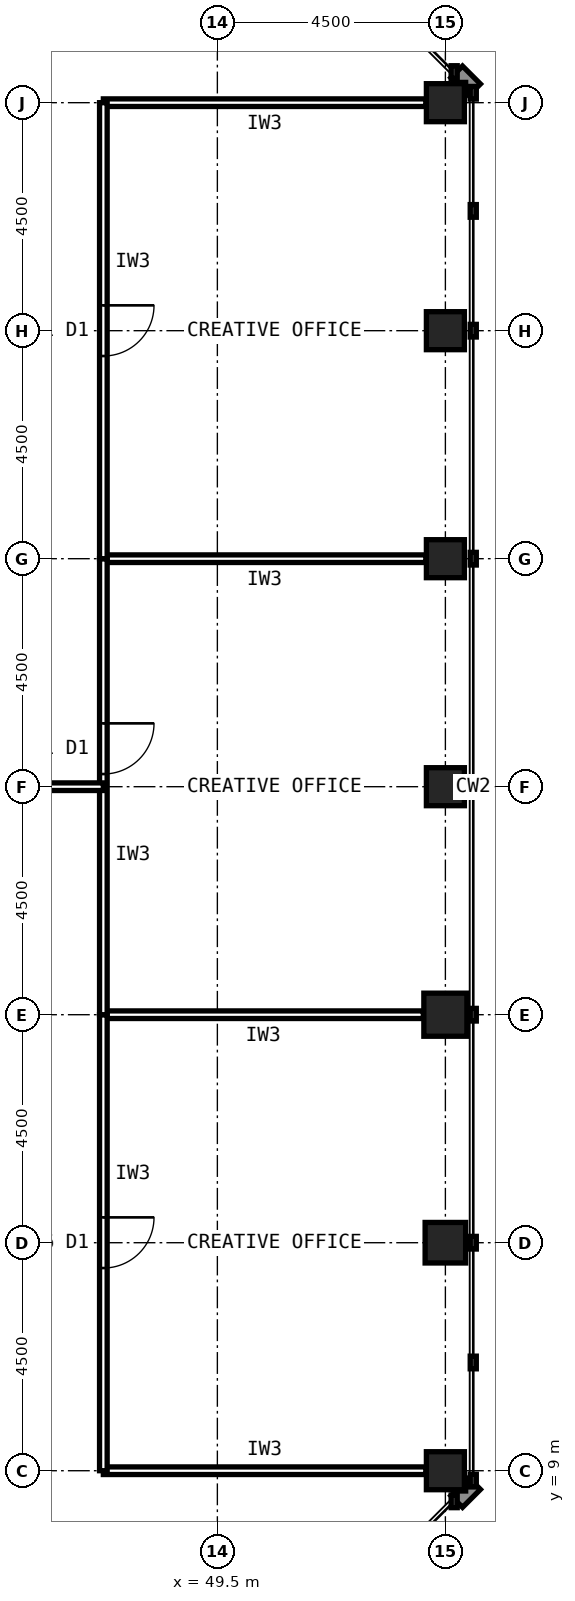
"""IFC4 building model, lengths in metres.
Left out: names, types, materials, properties, quantities, classifications, styles, units other than length and angle.
Written with IfcOpenShell. Run it as: python <this file> out.ifc"""

import sys

from ifc_helpers import new_model, si_unit, direction, frame, frame_2d, origin, origin_2d, place, context, subcontext, project, spatial, rectangle, hollow_rectangle, extrude, element, fill, save


model = new_model("IFC4")
c1 = context("Model", 3, precision=1e-05, world=origin(), true_north=direction((0.0, 1.0)))
c2 = subcontext(c1, "Body", "Model", "MODEL_VIEW")
j1 = project(units=[si_unit("LENGTHUNIT", "METRE"), si_unit("PLANEANGLEUNIT", "RADIAN")], contexts=[c1])
p1 = place(None, origin())
s1 = spatial("IfcSite", under=j1, at=p1, CompositionType="ELEMENT")
p2 = place(p1, origin())
s2 = spatial("IfcBuilding", under=s1, at=p2, CompositionType="ELEMENT")
p3 = place(p2, frame((0.0, 0.0, 151.6)))
s3 = spatial("IfcBuildingStorey", under=s2, at=p3, CompositionType="ELEMENT", Elevation=151.6)
p4 = place(p3, frame((54.0, 9.0, 0.0), z_axis=(0.0, 0.0, 1.0), x_axis=(1.0, 0.0, 0.0)))
e1 = element("IfcColumn", 1, at=p4, inside=s3, PredefinedType="COLUMN", context=c2, shape_type="SweptSolid", body=[
    extrude(hollow_rectangle(XDim=0.75, YDim=0.75, WallThickness=0.04, at=origin_2d()), origin(), (0.0, 0.0, 1.0), 4.0),
])
p5 = place(p3, frame((54.0, 13.5, 0.0), z_axis=(0.0, 0.0, 1.0), x_axis=(1.0, 0.0, 0.0)))
e2 = element("IfcColumn", 2, at=p5, inside=s3, PredefinedType="COLUMN", context=c2, shape_type="SweptSolid", body=[
    extrude(hollow_rectangle(XDim=0.8, YDim=0.8, WallThickness=0.045, at=origin_2d()), origin(), (0.0, 0.0, 1.0), 4.0),
])
p6 = place(p3, frame((54.0, 18.0, 0.0), z_axis=(0.0, 0.0, 1.0), x_axis=(1.0, 0.0, 0.0)))
e3 = element("IfcColumn", 3, at=p6, inside=s3, PredefinedType="COLUMN", context=c2, shape_type="SweptSolid", body=[
    extrude(hollow_rectangle(XDim=0.85, YDim=0.85, WallThickness=0.05, at=origin_2d()), origin(), (0.0, 0.0, 1.0), 4.0),
])
for number, where, z_axis, x_axis in (
    (4, (54.0, 22.5, 0.0), (0.0, 0.0, 1.0), (1.0, 0.0, 0.0)),
    (5, (54.0, 27.0, 0.0), (0.0, 0.0, 1.0), (1.0, 0.0, 0.0)),
    (6, (54.0, 31.5, 0.0), (0.0, 0.0, 1.0), (1.0, 0.0, 0.0)),
    (7, (54.0, 36.0, 0.0), (0.0, 0.0, 1.0), (1.0, 0.0, 0.0)),
):
    element("IfcColumn", number, at=place(p3, frame(where, z_axis=z_axis, x_axis=x_axis)), inside=s3, PredefinedType="COLUMN", context=c2, shape_type="SweptSolid", body=[
        extrude(hollow_rectangle(XDim=0.75, YDim=0.75, WallThickness=0.04, at=origin_2d()), origin(), (0.0, 0.0, 1.0), 4.0),
    ])
p7 = place(p3, frame((47.25, 9.0, 0.0), z_axis=(0.0, 0.0, 1.0), x_axis=(1.0, 0.0, 0.0)))
e8 = element("IfcWall", 8, at=p7, inside=s3, PredefinedType="PARTITIONING", context=c2, shape_type="SweptSolid", body=[
    extrude(rectangle(XDim=6.365, YDim=0.15, at=frame_2d((3.183, 0.0))), origin(), (0.0, 0.0, 1.0), 3.229),
])
p8 = place(p3, frame((53.565, 18.0, 0.0), z_axis=(0.0, 0.0, 1.0), x_axis=(-1.0, 0.0, 0.0)))
e9 = element("IfcWall", 9, at=p8, inside=s3, PredefinedType="PARTITIONING", context=c2, shape_type="SweptSolid", body=[
    extrude(rectangle(XDim=6.315, YDim=0.15, at=frame_2d((3.157, 0.0))), origin(), (0.0, 0.0, 1.0), 2.989),
])
p9 = place(p3, frame((47.25, 18.0, 0.0), z_axis=(0.0, 0.0, 1.0), x_axis=(0.0, -1.0, 0.0)))
e10 = element("IfcWall", 10, at=p9, inside=s3, PredefinedType="PARTITIONING", context=c2, shape_type="SweptSolid", body=[
    extrude(rectangle(XDim=9.0, YDim=0.15, at=frame_2d((4.5, 0.0))), origin(), (0.0, 0.0, 1.0), 3.84),
])
p10 = place(p9, frame((4.0, 0.0, 0.0)))
e11 = element("IfcOpeningElement", 11, at=p10, cuts=e10, PredefinedType="OPENING", context=c2, shape_type="SweptSolid", body=[
    extrude(rectangle(XDim=1.0, YDim=2.1, at=frame_2d((0.5, 1.05))), frame((0.0, 0.085, 0.0), z_axis=(0.0, -1.0, 0.0), x_axis=(1.0, 0.0, 0.0)), (0.0, 0.0, 1.0), 0.17),
])
p11 = place(p3, frame((53.615, 27.0, 0.0), z_axis=(0.0, 0.0, 1.0), x_axis=(-1.0, 0.0, 0.0)))
e12 = element("IfcWall", 12, at=p11, inside=s3, PredefinedType="PARTITIONING", context=c2, shape_type="SweptSolid", body=[
    extrude(rectangle(XDim=6.365, YDim=0.15, at=frame_2d((3.183, 0.0))), origin(), (0.0, 0.0, 1.0), 2.989),
])
p12 = place(p3, frame((47.25, 27.0, 0.0), z_axis=(0.0, 0.0, 1.0), x_axis=(0.0, -1.0, 0.0)))
e13 = element("IfcWall", 13, at=p12, inside=s3, PredefinedType="PARTITIONING", context=c2, shape_type="SweptSolid", body=[
    extrude(rectangle(XDim=9.0, YDim=0.15, at=frame_2d((4.5, 0.0))), origin(), (0.0, 0.0, 1.0), 3.84),
])
p13 = place(p12, frame((3.25, 0.0, 0.0)))
e14 = element("IfcOpeningElement", 14, at=p13, cuts=e13, PredefinedType="OPENING", context=c2, shape_type="SweptSolid", body=[
    extrude(rectangle(XDim=1.0, YDim=2.1, at=frame_2d((0.5, 1.05))), frame((0.0, 0.085, 0.0), z_axis=(0.0, -1.0, 0.0), x_axis=(1.0, 0.0, 0.0)), (0.0, 0.0, 1.0), 0.17),
])
p14 = place(p3, frame((53.615, 36.0, 0.0), z_axis=(0.0, 0.0, 1.0), x_axis=(-1.0, 0.0, 0.0)))
e15 = element("IfcWall", 15, at=p14, inside=s3, PredefinedType="PARTITIONING", context=c2, shape_type="SweptSolid", body=[
    extrude(rectangle(XDim=6.365, YDim=0.15, at=frame_2d((3.183, 0.0))), origin(), (0.0, 0.0, 1.0), 2.989),
])
p15 = place(p3, frame((47.25, 36.0, 0.0), z_axis=(0.0, 0.0, 1.0), x_axis=(0.0, -1.0, 0.0)))
e16 = element("IfcWall", 16, at=p15, inside=s3, PredefinedType="PARTITIONING", context=c2, shape_type="SweptSolid", body=[
    extrude(rectangle(XDim=9.0, YDim=0.15, at=frame_2d((4.5, 0.0))), origin(), (0.0, 0.0, 1.0), 3.84),
])
p16 = place(p15, frame((4.0, 0.0, 0.0)))
e17 = element("IfcOpeningElement", 17, at=p16, cuts=e16, PredefinedType="OPENING", context=c2, shape_type="SweptSolid", body=[
    extrude(rectangle(XDim=1.0, YDim=2.1, at=frame_2d((0.5, 1.05))), frame((0.0, 0.085, 0.0), z_axis=(0.0, -1.0, 0.0), x_axis=(1.0, 0.0, 0.0)), (0.0, 0.0, 1.0), 0.17),
])
p17 = place(p3, frame((42.3, 22.5, 0.0), z_axis=(0.0, 0.0, 1.0), x_axis=(1.0, 0.0, 0.0)))
e18 = element("IfcWall", 18, at=p17, inside=s3, PredefinedType="PARTITIONING", context=c2, shape_type="SweptSolid", body=[
    extrude(rectangle(XDim=4.95, YDim=0.15, at=frame_2d((2.475, 0.0))), origin(), (0.0, 0.0, 1.0), 2.989),
])
p18 = place(p17, frame((1.975, 0.0, 0.0)))
e19 = element("IfcOpeningElement", 19, at=p18, cuts=e18, PredefinedType="OPENING", context=c2, shape_type="SweptSolid", body=[
    extrude(rectangle(XDim=1.0, YDim=2.1, at=frame_2d((0.5, 1.05))), frame((0.0, 0.085, 0.0), z_axis=(0.0, -1.0, 0.0), x_axis=(1.0, 0.0, 0.0)), (0.0, 0.0, 1.0), 0.17),
])
p19 = place(p10, origin())
e20 = element("IfcDoor", 20, at=p19, inside=s3, OperationType="SINGLE_SWING_LEFT", PredefinedType="DOOR", context=c2, shape_type="SweptSolid", body=[
    extrude(rectangle(XDim=1.0, YDim=2.1, at=frame_2d((0.5, 1.05))), frame((0.0, 0.025, 0.0), z_axis=(0.0, -1.0, 0.0), x_axis=(1.0, 0.0, 0.0)), (0.0, 0.0, 1.0), 0.05),
])
fill(e11, e20)
p20 = place(p13, origin())
e21 = element("IfcDoor", 21, at=p20, inside=s3, OperationType="SINGLE_SWING_LEFT", PredefinedType="DOOR", context=c2, shape_type="SweptSolid", body=[
    extrude(rectangle(XDim=1.0, YDim=2.1, at=frame_2d((0.5, 1.05))), frame((0.0, 0.025, 0.0), z_axis=(0.0, -1.0, 0.0), x_axis=(1.0, 0.0, 0.0)), (0.0, 0.0, 1.0), 0.05),
])
fill(e14, e21)
p21 = place(p16, origin())
e22 = element("IfcDoor", 22, at=p21, inside=s3, OperationType="SINGLE_SWING_LEFT", PredefinedType="DOOR", context=c2, shape_type="SweptSolid", body=[
    extrude(rectangle(XDim=1.0, YDim=2.1, at=frame_2d((0.5, 1.05))), frame((0.0, 0.025, 0.0), z_axis=(0.0, -1.0, 0.0), x_axis=(1.0, 0.0, 0.0)), (0.0, 0.0, 1.0), 0.05),
])
fill(e17, e22)
save(model, sys.argv[1])
